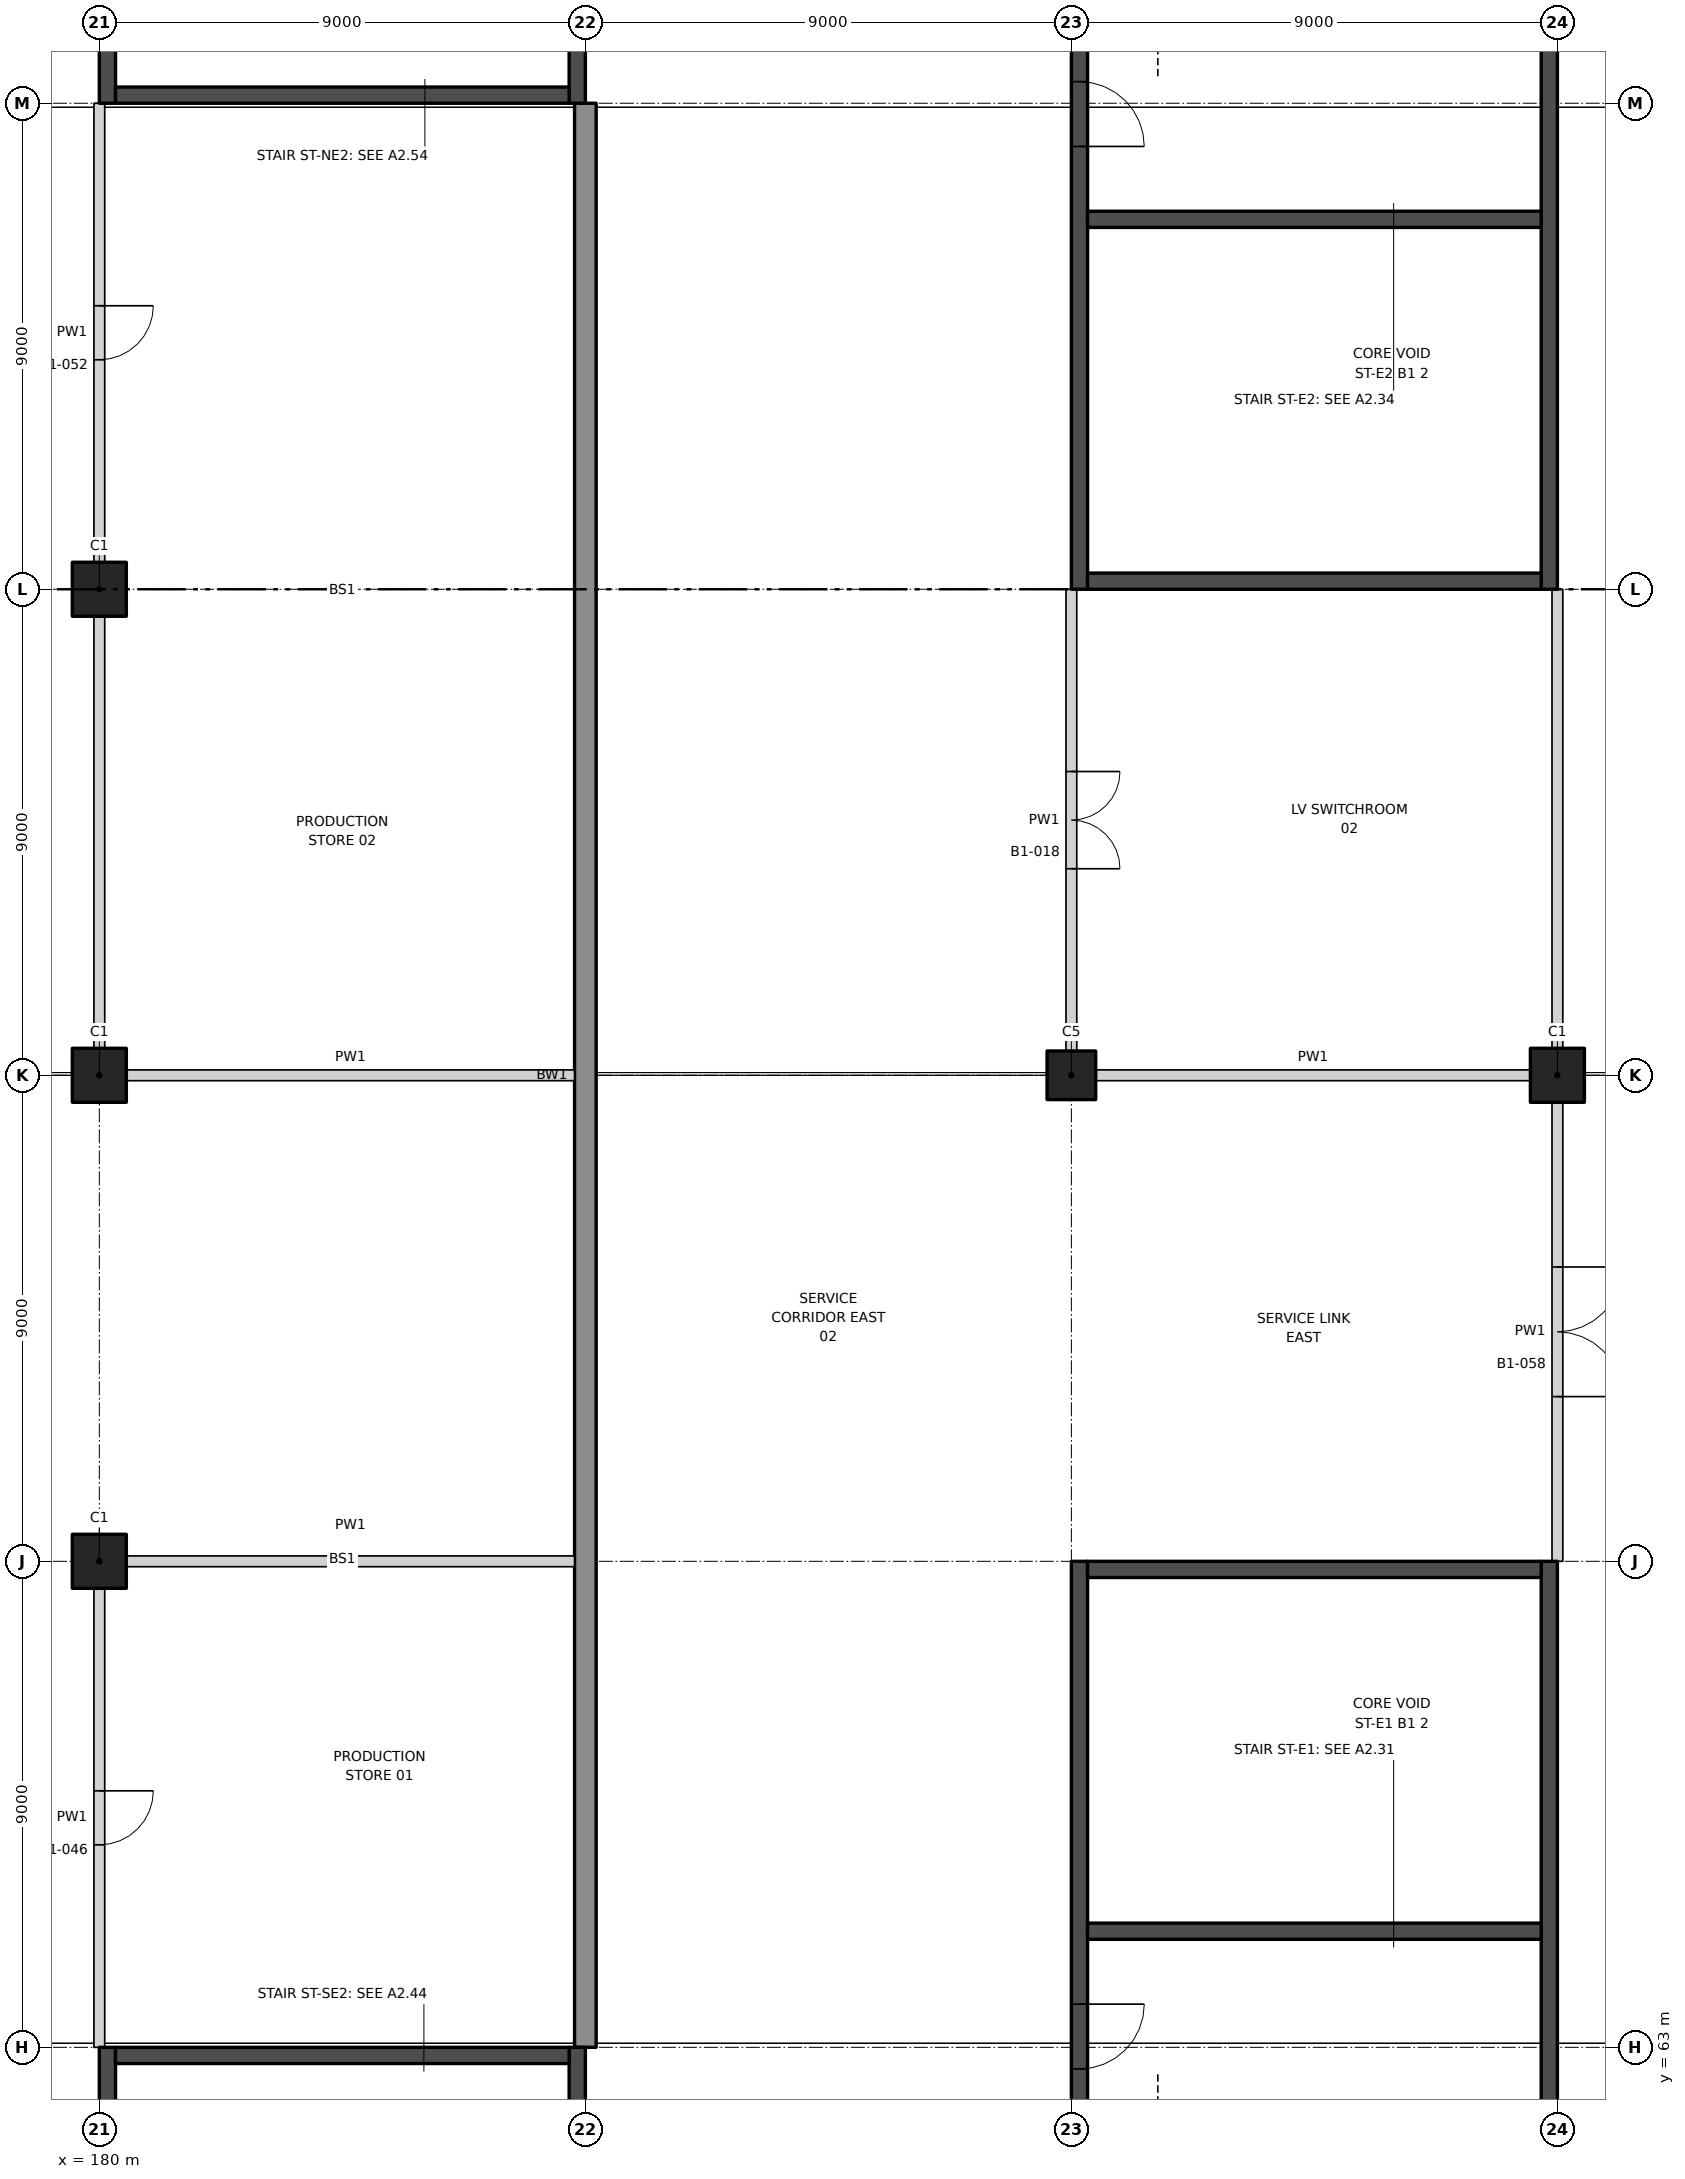
"""IFC4 building model, lengths in metres.
Left out: names, types, materials, properties, quantities, classifications, styles, units other than length and angle.
Written with IfcOpenShell. Run it as: python <this file> out.ifc"""

import sys

from ifc_helpers import new_model, si_unit, direction, frame, frame_2d, origin, origin_2d, place, context, subcontext, project, spatial, rectangle, extrude, element, fill, save


model = new_model("IFC4")
c1 = context("Model", 3, precision=1e-05, world=origin(), true_north=direction((0.0, 1.0)))
c2 = subcontext(c1, "Body", "Model", "MODEL_VIEW")
j1 = project(units=[si_unit("LENGTHUNIT", "METRE"), si_unit("PLANEANGLEUNIT", "RADIAN")], contexts=[c1])
p1 = place(None, origin())
s1 = spatial("IfcSite", under=j1, at=p1, CompositionType="ELEMENT")
p2 = place(p1, origin())
s2 = spatial("IfcBuilding", under=s1, at=p2, CompositionType="ELEMENT")
p3 = place(p2, frame((0.0, 0.0, -6.0)))
s3 = spatial("IfcBuildingStorey", under=s2, at=p3, CompositionType="ELEMENT", Elevation=-6.0)
p4 = place(p3, frame((207.0, 81.0, 0.0), z_axis=(0.0, 0.0, 1.0), x_axis=(1.0, 0.0, 0.0)))
e1 = element("IfcColumn", 1, at=p4, inside=s3, PredefinedType="COLUMN", context=c2, shape_type="SweptSolid", body=[
    extrude(rectangle(XDim=1.0, YDim=1.0, at=origin_2d()), origin(), (0.0, 0.0, 1.0), 6.0),
])
p5 = place(p3, frame((198.0, 81.0, 0.0), z_axis=(0.0, 0.0, 1.0), x_axis=(1.0, 0.0, 0.0)))
e2 = element("IfcColumn", 2, at=p5, inside=s3, PredefinedType="COLUMN", context=c2, shape_type="SweptSolid", body=[
    extrude(rectangle(XDim=0.9, YDim=0.9, at=origin_2d()), origin(), (0.0, 0.0, 1.0), 6.0),
])
for number, where, z_axis, x_axis in (
    (3, (180.0, 72.0, 0.0), (0.0, 0.0, 1.0), (1.0, 0.0, 0.0)),
    (4, (180.0, 81.0, 0.0), (0.0, 0.0, 1.0), (1.0, 0.0, 0.0)),
    (5, (180.0, 90.0, 0.0), (0.0, 0.0, 1.0), (1.0, 0.0, 0.0)),
):
    element("IfcColumn", number, at=place(p3, frame(where, z_axis=z_axis, x_axis=x_axis)), inside=s3, PredefinedType="COLUMN", context=c2, shape_type="SweptSolid", body=[
        extrude(rectangle(XDim=1.0, YDim=1.0, at=origin_2d()), origin(), (0.0, 0.0, 1.0), 6.0),
    ])
p6 = place(p3, frame((189.0, 63.0, 0.0), z_axis=(0.0, 0.0, 1.0), x_axis=(0.0, 1.0, 0.0)))
e6 = element("IfcWall", 6, at=p6, inside=s3, PredefinedType="SOLIDWALL", context=c2, shape_type="SweptSolid", body=[
    extrude(rectangle(XDim=36.0, YDim=0.4, at=frame_2d((18.0, 0.0))), origin(), (0.0, 0.0, 1.0), 6.0),
])
for number, where, z_axis, x_axis in (
    (7, (180.5, 72.0, 0.0), (0.0, 0.0, 1.0), (1.0, 0.0, 0.0)),
    (8, (180.5, 81.0, 0.0), (0.0, 0.0, 1.0), (1.0, 0.0, 0.0)),
):
    element("IfcWall", number, at=place(p3, frame(where, z_axis=z_axis, x_axis=x_axis)), inside=s3, PredefinedType="PARTITIONING", context=c2, shape_type="SweptSolid", body=[
        extrude(rectangle(XDim=8.3, YDim=0.2, at=frame_2d((4.15, 0.0))), origin(), (0.0, 0.0, 1.0), 4.65),
    ])
p7 = place(p3, frame((198.45, 81.0, 0.0), z_axis=(0.0, 0.0, 1.0), x_axis=(1.0, 0.0, 0.0)))
e9 = element("IfcWall", 9, at=p7, inside=s3, PredefinedType="PARTITIONING", context=c2, shape_type="SweptSolid", body=[
    extrude(rectangle(XDim=8.05, YDim=0.2, at=frame_2d((4.025, 0.0))), origin(), (0.0, 0.0, 1.0), 4.65),
])
p8 = place(p3, frame((180.0, 63.0, 0.0), z_axis=(0.0, 0.0, 1.0), x_axis=(0.0, 1.0, 0.0)))
e10 = element("IfcWall", 10, at=p8, inside=s3, PredefinedType="PARTITIONING", context=c2, shape_type="SweptSolid", body=[
    extrude(rectangle(XDim=8.5, YDim=0.2, at=frame_2d((4.25, 0.0))), origin(), (0.0, 0.0, 1.0), 4.55),
])
p9 = place(p8, frame((3.75, 0.0, 0.0)))
e11 = element("IfcOpeningElement", 11, at=p9, cuts=e10, PredefinedType="OPENING", context=c2, shape_type="SweptSolid", body=[
    extrude(rectangle(XDim=1.0, YDim=2.1, at=frame_2d((0.5, 1.05))), frame((0.0, 0.11, 0.0), z_axis=(0.0, -1.0, 0.0), x_axis=(1.0, 0.0, 0.0)), (0.0, 0.0, 1.0), 0.22),
])
p10 = place(p3, frame((180.0, 81.5, 0.0), z_axis=(0.0, 0.0, 1.0), x_axis=(0.0, 1.0, 0.0)))
e12 = element("IfcWall", 12, at=p10, inside=s3, PredefinedType="PARTITIONING", context=c2, shape_type="SweptSolid", body=[
    extrude(rectangle(XDim=8.0, YDim=0.2, at=frame_2d((4.0, 0.0))), origin(), (0.0, 0.0, 1.0), 4.65),
])
p11 = place(p3, frame((180.0, 90.5, 0.0), z_axis=(0.0, 0.0, 1.0), x_axis=(0.0, 1.0, 0.0)))
e13 = element("IfcWall", 13, at=p11, inside=s3, PredefinedType="PARTITIONING", context=c2, shape_type="SweptSolid", body=[
    extrude(rectangle(XDim=8.5, YDim=0.2, at=frame_2d((4.25, 0.0))), origin(), (0.0, 0.0, 1.0), 4.55),
])
p12 = place(p11, frame((3.75, 0.0, 0.0)))
e14 = element("IfcOpeningElement", 14, at=p12, cuts=e13, PredefinedType="OPENING", context=c2, shape_type="SweptSolid", body=[
    extrude(rectangle(XDim=1.0, YDim=2.1, at=frame_2d((0.5, 1.05))), frame((0.0, 0.11, 0.0), z_axis=(0.0, -1.0, 0.0), x_axis=(1.0, 0.0, 0.0)), (0.0, 0.0, 1.0), 0.22),
])
p13 = place(p3, frame((198.0, 81.45, 0.0), z_axis=(0.0, 0.0, 1.0), x_axis=(0.0, 1.0, 0.0)))
e15 = element("IfcWall", 15, at=p13, inside=s3, PredefinedType="PARTITIONING", context=c2, shape_type="SweptSolid", body=[
    extrude(rectangle(XDim=8.55, YDim=0.2, at=frame_2d((4.275, 0.0))), origin(), (0.0, 0.0, 1.0), 4.55),
])
p14 = place(p13, frame((3.375, 0.0, 0.0)))
e16 = element("IfcOpeningElement", 16, at=p14, cuts=e15, PredefinedType="OPENING", context=c2, shape_type="SweptSolid", body=[
    extrude(rectangle(XDim=1.8, YDim=2.1, at=frame_2d((0.9, 1.05))), frame((0.0, 0.11, 0.0), z_axis=(0.0, -1.0, 0.0), x_axis=(1.0, 0.0, 0.0)), (0.0, 0.0, 1.0), 0.22),
])
p15 = place(p3, frame((207.0, 72.0, 0.0), z_axis=(0.0, 0.0, 1.0), x_axis=(0.0, 1.0, 0.0)))
e17 = element("IfcWall", 17, at=p15, inside=s3, PredefinedType="PARTITIONING", context=c2, shape_type="SweptSolid", body=[
    extrude(rectangle(XDim=8.5, YDim=0.2, at=frame_2d((4.25, 0.0))), origin(), (0.0, 0.0, 1.0), 4.55),
])
p16 = place(p15, frame((3.05, 0.0, 0.0)))
e18 = element("IfcOpeningElement", 18, at=p16, cuts=e17, PredefinedType="OPENING", context=c2, shape_type="SweptSolid", body=[
    extrude(rectangle(XDim=2.4, YDim=2.4, at=frame_2d((1.2, 1.2))), frame((0.0, 0.11, 0.0), z_axis=(0.0, -1.0, 0.0), x_axis=(1.0, 0.0, 0.0)), (0.0, 0.0, 1.0), 0.22),
])
p17 = place(p3, frame((207.0, 81.5, 0.0), z_axis=(0.0, 0.0, 1.0), x_axis=(0.0, 1.0, 0.0)))
e19 = element("IfcWall", 19, at=p17, inside=s3, PredefinedType="PARTITIONING", context=c2, shape_type="SweptSolid", body=[
    extrude(rectangle(XDim=8.5, YDim=0.2, at=frame_2d((4.25, 0.0))), origin(), (0.0, 0.0, 1.0), 4.65),
])
p18 = place(p3, frame((198.15, 54.0, 0.0), z_axis=(0.0, 0.0, 1.0), x_axis=(0.0, 1.0, 0.0)))
e20 = element("IfcWall", 20, at=p18, inside=s3, PredefinedType="SHEAR", context=c2, shape_type="SweptSolid", body=[
    extrude(rectangle(XDim=18.0, YDim=0.3, at=frame_2d((9.0, 0.0))), origin(), (0.0, 0.0, 1.0), 6.0),
])
p19 = place(p18, frame((8.6, 0.0, 0.0)))
e21 = element("IfcOpeningElement", 21, at=p19, cuts=e20, PredefinedType="OPENING", context=c2, shape_type="SweptSolid", body=[
    extrude(rectangle(XDim=1.2, YDim=2.1, at=frame_2d((0.6, 1.05))), frame((0.0, 0.16, 0.0), z_axis=(0.0, -1.0, 0.0), x_axis=(1.0, 0.0, 0.0)), (0.0, 0.0, 1.0), 0.32),
])
p20 = place(p3, frame((206.85, 54.0, 0.0), z_axis=(0.0, 0.0, 1.0), x_axis=(0.0, 1.0, 0.0)))
e22 = element("IfcWall", 22, at=p20, inside=s3, PredefinedType="SHEAR", context=c2, shape_type="SweptSolid", body=[
    extrude(rectangle(XDim=18.0, YDim=0.3, at=frame_2d((9.0, 0.0))), origin(), (0.0, 0.0, 1.0), 6.0),
])
for number, where, z_axis, x_axis in (
    (23, (198.3, 71.85, 0.0), (0.0, 0.0, 1.0), (1.0, 0.0, 0.0)),
    (24, (198.3, 65.15, 0.0), (0.0, 0.0, 1.0), (1.0, 0.0, 0.0)),
):
    element("IfcWall", number, at=place(p3, frame(where, z_axis=z_axis, x_axis=x_axis)), inside=s3, PredefinedType="SHEAR", context=c2, shape_type="SweptSolid", body=[
        extrude(rectangle(XDim=8.4, YDim=0.3, at=frame_2d((4.2, 0.0))), origin(), (0.0, 0.0, 1.0), 6.0),
    ])
p21 = place(p3, frame((198.15, 108.0, 0.0), z_axis=(0.0, 0.0, 1.0), x_axis=(0.0, -1.0, 0.0)))
e25 = element("IfcWall", 25, at=p21, inside=s3, PredefinedType="SHEAR", context=c2, shape_type="SweptSolid", body=[
    extrude(rectangle(XDim=18.0, YDim=0.3, at=frame_2d((9.0, 0.0))), origin(), (0.0, 0.0, 1.0), 6.0),
])
p22 = place(p21, frame((8.6, 0.0, 0.0)))
e26 = element("IfcOpeningElement", 26, at=p22, cuts=e25, PredefinedType="OPENING", context=c2, shape_type="SweptSolid", body=[
    extrude(rectangle(XDim=1.2, YDim=2.1, at=frame_2d((0.6, 1.05))), frame((0.0, 0.16, 0.0), z_axis=(0.0, -1.0, 0.0), x_axis=(1.0, 0.0, 0.0)), (0.0, 0.0, 1.0), 0.32),
])
p23 = place(p3, frame((206.85, 108.0, 0.0), z_axis=(0.0, 0.0, 1.0), x_axis=(0.0, -1.0, 0.0)))
e27 = element("IfcWall", 27, at=p23, inside=s3, PredefinedType="SHEAR", context=c2, shape_type="SweptSolid", body=[
    extrude(rectangle(XDim=18.0, YDim=0.3, at=frame_2d((9.0, 0.0))), origin(), (0.0, 0.0, 1.0), 6.0),
])
for number, where, z_axis, x_axis in (
    (28, (198.3, 90.15, 0.0), (0.0, 0.0, 1.0), (1.0, 0.0, 0.0)),
    (29, (198.3, 96.85, 0.0), (0.0, 0.0, 1.0), (1.0, 0.0, 0.0)),
):
    element("IfcWall", number, at=place(p3, frame(where, z_axis=z_axis, x_axis=x_axis)), inside=s3, PredefinedType="SHEAR", context=c2, shape_type="SweptSolid", body=[
        extrude(rectangle(XDim=8.4, YDim=0.3, at=frame_2d((4.2, 0.0))), origin(), (0.0, 0.0, 1.0), 6.0),
    ])
p24 = place(p3, frame((180.15, 63.0, 0.0), z_axis=(0.0, 0.0, 1.0), x_axis=(0.0, -1.0, 0.0)))
e30 = element("IfcWall", 30, at=p24, inside=s3, PredefinedType="SHEAR", context=c2, shape_type="SweptSolid", body=[
    extrude(rectangle(XDim=18.0, YDim=0.3, at=frame_2d((9.0, 0.0))), origin(), (0.0, 0.0, 1.0), 6.0),
])
p25 = place(p24, frame((1.5, 0.0, 0.0)))
e31 = element("IfcOpeningElement", 31, at=p25, cuts=e30, PredefinedType="OPENING", context=c2, shape_type="SweptSolid", body=[
    extrude(rectangle(XDim=1.2, YDim=2.1, at=frame_2d((0.6, 1.05))), frame((0.0, 0.16, 0.0), z_axis=(0.0, -1.0, 0.0), x_axis=(1.0, 0.0, 0.0)), (0.0, 0.0, 1.0), 0.32),
])
p26 = place(p3, frame((188.85, 63.0, 0.0), z_axis=(0.0, 0.0, 1.0), x_axis=(0.0, -1.0, 0.0)))
e32 = element("IfcWall", 32, at=p26, inside=s3, PredefinedType="SHEAR", context=c2, shape_type="SweptSolid", body=[
    extrude(rectangle(XDim=18.0, YDim=0.3, at=frame_2d((9.0, 0.0))), origin(), (0.0, 0.0, 1.0), 6.0),
])
p27 = place(p3, frame((180.3, 62.85, 0.0), z_axis=(0.0, 0.0, 1.0), x_axis=(1.0, 0.0, 0.0)))
e33 = element("IfcWall", 33, at=p27, inside=s3, PredefinedType="SHEAR", context=c2, shape_type="SweptSolid", body=[
    extrude(rectangle(XDim=8.4, YDim=0.3, at=frame_2d((4.2, 0.0))), origin(), (0.0, 0.0, 1.0), 6.0),
])
p28 = place(p3, frame((180.15, 99.0, 0.0), z_axis=(0.0, 0.0, 1.0), x_axis=(0.0, 1.0, 0.0)))
e34 = element("IfcWall", 34, at=p28, inside=s3, PredefinedType="SHEAR", context=c2, shape_type="SweptSolid", body=[
    extrude(rectangle(XDim=18.0, YDim=0.3, at=frame_2d((9.0, 0.0))), origin(), (0.0, 0.0, 1.0), 6.0),
])
p29 = place(p28, frame((1.5, 0.0, 0.0)))
e35 = element("IfcOpeningElement", 35, at=p29, cuts=e34, PredefinedType="OPENING", context=c2, shape_type="SweptSolid", body=[
    extrude(rectangle(XDim=1.2, YDim=2.1, at=frame_2d((0.6, 1.05))), frame((0.0, 0.16, 0.0), z_axis=(0.0, -1.0, 0.0), x_axis=(1.0, 0.0, 0.0)), (0.0, 0.0, 1.0), 0.32),
])
p30 = place(p3, frame((188.85, 99.0, 0.0), z_axis=(0.0, 0.0, 1.0), x_axis=(0.0, 1.0, 0.0)))
e36 = element("IfcWall", 36, at=p30, inside=s3, PredefinedType="SHEAR", context=c2, shape_type="SweptSolid", body=[
    extrude(rectangle(XDim=18.0, YDim=0.3, at=frame_2d((9.0, 0.0))), origin(), (0.0, 0.0, 1.0), 6.0),
])
p31 = place(p3, frame((180.3, 99.15, 0.0), z_axis=(0.0, 0.0, 1.0), x_axis=(1.0, 0.0, 0.0)))
e37 = element("IfcWall", 37, at=p31, inside=s3, PredefinedType="SHEAR", context=c2, shape_type="SweptSolid", body=[
    extrude(rectangle(XDim=8.4, YDim=0.3, at=frame_2d((4.2, 0.0))), origin(), (0.0, 0.0, 1.0), 6.0),
])
p32 = place(p14, frame((1.8, 0.0, 0.0), z_axis=(0.0, 0.0, 1.0), x_axis=(-1.0, 0.0, 0.0)))
e38 = element("IfcDoor", 38, at=p32, inside=s3, OperationType="DOUBLE_DOOR_DOUBLE_SWING", PredefinedType="DOOR", context=c2, shape_type="SweptSolid", body=[
    extrude(rectangle(XDim=1.8, YDim=2.1, at=frame_2d((0.9, 1.05))), frame((0.0, 0.025, 0.0), z_axis=(0.0, -1.0, 0.0), x_axis=(1.0, 0.0, 0.0)), (0.0, 0.0, 1.0), 0.05),
])
fill(e16, e38)
p33 = place(p9, frame((1.0, 0.0, 0.0), z_axis=(0.0, 0.0, 1.0), x_axis=(-1.0, 0.0, 0.0)))
e39 = element("IfcDoor", 39, at=p33, inside=s3, OperationType="SINGLE_SWING_LEFT", PredefinedType="DOOR", context=c2, shape_type="SweptSolid", body=[
    extrude(rectangle(XDim=1.0, YDim=2.1, at=frame_2d((0.5, 1.05))), frame((0.0, 0.025, 0.0), z_axis=(0.0, -1.0, 0.0), x_axis=(1.0, 0.0, 0.0)), (0.0, 0.0, 1.0), 0.05),
])
fill(e11, e39)
p34 = place(p12, frame((1.0, 0.0, 0.0), z_axis=(0.0, 0.0, 1.0), x_axis=(-1.0, 0.0, 0.0)))
e40 = element("IfcDoor", 40, at=p34, inside=s3, OperationType="SINGLE_SWING_LEFT", PredefinedType="DOOR", context=c2, shape_type="SweptSolid", body=[
    extrude(rectangle(XDim=1.0, YDim=2.1, at=frame_2d((0.5, 1.05))), frame((0.0, 0.025, 0.0), z_axis=(0.0, -1.0, 0.0), x_axis=(1.0, 0.0, 0.0)), (0.0, 0.0, 1.0), 0.05),
])
fill(e14, e40)
p35 = place(p16, frame((2.4, 0.0, 0.0), z_axis=(0.0, 0.0, 1.0), x_axis=(-1.0, 0.0, 0.0)))
e41 = element("IfcDoor", 41, at=p35, inside=s3, OperationType="DOUBLE_DOOR_DOUBLE_SWING", PredefinedType="DOOR", context=c2, shape_type="SweptSolid", body=[
    extrude(rectangle(XDim=2.4, YDim=2.4, at=frame_2d((1.2, 1.2))), frame((0.0, 0.025, 0.0), z_axis=(0.0, -1.0, 0.0), x_axis=(1.0, 0.0, 0.0)), (0.0, 0.0, 1.0), 0.05),
])
fill(e18, e41)
p36 = place(p19, frame((1.2, 0.0, 0.0), z_axis=(0.0, 0.0, 1.0), x_axis=(-1.0, 0.0, 0.0)))
e42 = element("IfcDoor", 42, at=p36, inside=s3, OperationType="SINGLE_SWING_LEFT", PredefinedType="DOOR", context=c2, shape_type="SweptSolid", body=[
    extrude(rectangle(XDim=1.2, YDim=2.1, at=frame_2d((0.6, 1.05))), frame((0.0, 0.025, 0.0), z_axis=(0.0, -1.0, 0.0), x_axis=(1.0, 0.0, 0.0)), (0.0, 0.0, 1.0), 0.05),
])
fill(e21, e42)
p37 = place(p22, origin())
e43 = element("IfcDoor", 43, at=p37, inside=s3, OperationType="SINGLE_SWING_RIGHT", PredefinedType="DOOR", context=c2, shape_type="SweptSolid", body=[
    extrude(rectangle(XDim=1.2, YDim=2.1, at=frame_2d((0.6, 1.05))), frame((0.0, 0.025, 0.0), z_axis=(0.0, -1.0, 0.0), x_axis=(1.0, 0.0, 0.0)), (0.0, 0.0, 1.0), 0.05),
])
fill(e26, e43)
save(model, sys.argv[1])
